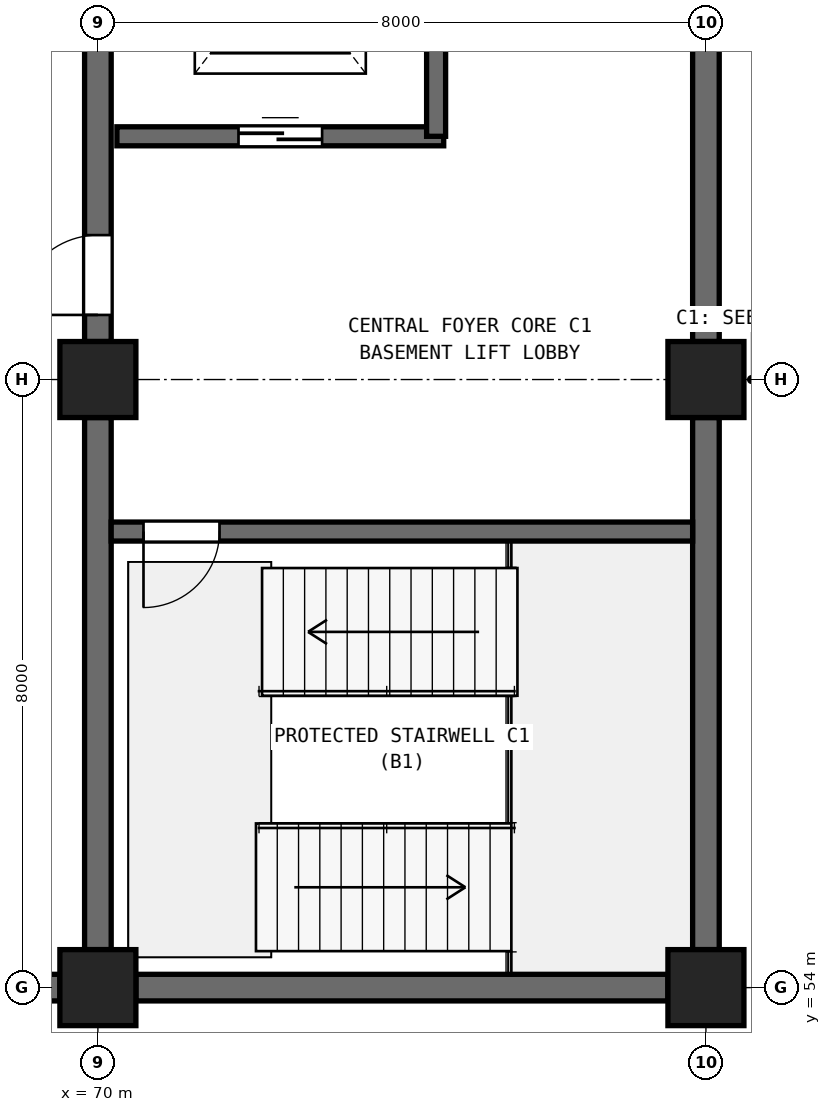
"""IFC4 building model, lengths in metres.
Left out: names, types, materials, properties, quantities, classifications, styles, units other than length and angle.
Written with IfcOpenShell. Run it as: python <this file> out.ifc"""

import sys

from ifc_helpers import new_model, si_unit, direction, frame, frame_2d, origin, origin_2d, place, context, subcontext, project, spatial, rectangle, extrude, element, fill, save


model = new_model("IFC4")
c1 = context("Model", 3, precision=1e-05, world=origin(), true_north=direction((0.0, 1.0)))
c2 = subcontext(c1, "Body", "Model", "MODEL_VIEW")
j1 = project(units=[si_unit("LENGTHUNIT", "METRE"), si_unit("PLANEANGLEUNIT", "RADIAN")], contexts=[c1])
p1 = place(None, origin())
s1 = spatial("IfcSite", under=j1, at=p1, CompositionType="ELEMENT")
p2 = place(p1, origin())
s2 = spatial("IfcBuilding", under=s1, at=p2, CompositionType="ELEMENT")
p3 = place(p2, frame((0.0, 0.0, -4.2)))
s3 = spatial("IfcBuildingStorey", under=s2, at=p3, CompositionType="ELEMENT", Elevation=-4.2)
for number, where, z_axis, x_axis in (
    (1, (70.0, 54.0, 0.0), (0.0, 0.0, 1.0), (1.0, 0.0, 0.0)),
    (2, (70.0, 62.0, 0.0), (0.0, 0.0, 1.0), (1.0, 0.0, 0.0)),
    (3, (78.0, 54.0, 0.0), (0.0, 0.0, 1.0), (1.0, 0.0, 0.0)),
    (4, (78.0, 62.0, 0.0), (0.0, 0.0, 1.0), (1.0, 0.0, 0.0)),
):
    element("IfcColumn", number, at=place(p3, frame(where, z_axis=z_axis, x_axis=x_axis)), inside=s3, PredefinedType="COLUMN", context=c2, shape_type="SweptSolid", body=[
        extrude(rectangle(XDim=1.0, YDim=1.0, at=origin_2d()), origin(), (0.0, 0.0, 1.0), 4.2),
    ])
p4 = place(p3, frame((62.35, 54.0, 0.0), z_axis=(0.0, 0.0, 1.0), x_axis=(1.0, 0.0, 0.0)))
e5 = element("IfcWall", 5, at=p4, inside=s3, PredefinedType="USERDEFINED", context=c2, shape_type="SweptSolid", body=[
    extrude(rectangle(XDim=7.15, YDim=0.35, at=frame_2d((3.575, 0.0))), origin(), (0.0, 0.0, 1.0), 3.92),
])
for number, where, z_axis, x_axis in (
    (6, (70.5, 54.0, 0.0), (0.0, 0.0, 1.0), (1.0, 0.0, 0.0)),
    (7, (70.0, 54.5, 0.0), (0.0, 0.0, 1.0), (0.0, 1.0, 0.0)),
):
    element("IfcWall", number, at=place(p3, frame(where, z_axis=z_axis, x_axis=x_axis)), inside=s3, PredefinedType="SHEAR", context=c2, shape_type="SweptSolid", body=[
        extrude(rectangle(XDim=7.0, YDim=0.35, at=frame_2d((3.5, 0.0))), origin(), (0.0, 0.0, 1.0), 3.98),
    ])
p5 = place(p3, frame((70.0, 62.5, 0.0), z_axis=(0.0, 0.0, 1.0), x_axis=(0.0, 1.0, 0.0)))
e8 = element("IfcWall", 8, at=p5, inside=s3, PredefinedType="SHEAR", context=c2, shape_type="SweptSolid", body=[
    extrude(rectangle(XDim=7.0, YDim=0.35, at=frame_2d((3.5, 0.0))), origin(), (0.0, 0.0, 1.0), 3.98),
])
p6 = place(p5, frame((0.35, 0.0, 0.0)))
e9 = element("IfcOpeningElement", 9, at=p6, cuts=e8, PredefinedType="OPENING", context=c2, shape_type="SweptSolid", body=[
    extrude(rectangle(XDim=1.05, YDim=2.2, at=frame_2d((0.525, 1.1))), frame((0.0, 0.185, 0.0), z_axis=(0.0, -1.0, 0.0), x_axis=(1.0, 0.0, 0.0)), (0.0, 0.0, 1.0), 0.37),
])
for number, where, z_axis, x_axis in (
    (10, (78.0, 54.5, 0.0), (0.0, 0.0, 1.0), (0.0, 1.0, 0.0)),
    (11, (78.0, 62.5, 0.0), (0.0, 0.0, 1.0), (0.0, 1.0, 0.0)),
):
    element("IfcWall", number, at=place(p3, frame(where, z_axis=z_axis, x_axis=x_axis)), inside=s3, PredefinedType="SHEAR", context=c2, shape_type="SweptSolid", body=[
        extrude(rectangle(XDim=7.0, YDim=0.35, at=frame_2d((3.5, 0.0))), origin(), (0.0, 0.0, 1.0), 3.98),
    ])
p7 = place(p3, frame((70.175, 60.0, 0.0), z_axis=(0.0, 0.0, 1.0), x_axis=(1.0, 0.0, 0.0)))
e12 = element("IfcWall", 12, at=p7, inside=s3, PredefinedType="SOLIDWALL", context=c2, shape_type="SweptSolid", body=[
    extrude(rectangle(XDim=7.65, YDim=0.25, at=frame_2d((3.825, 0.0))), origin(), (0.0, 0.0, 1.0), 3.98),
])
p8 = place(p7, frame((0.425, 0.0, 0.0)))
e13 = element("IfcOpeningElement", 13, at=p8, cuts=e12, PredefinedType="OPENING", context=c2, shape_type="SweptSolid", body=[
    extrude(rectangle(XDim=1.0, YDim=2.2, at=frame_2d((0.5, 1.1))), frame((0.0, 0.135, 0.0), z_axis=(0.0, -1.0, 0.0), x_axis=(1.0, 0.0, 0.0)), (0.0, 0.0, 1.0), 0.27),
])
p9 = place(p3, frame((70.25, 65.2, 0.0), z_axis=(0.0, 0.0, 1.0), x_axis=(1.0, 0.0, 0.0)))
e14 = element("IfcWall", 14, at=p9, inside=s3, PredefinedType="SOLIDWALL", context=c2, shape_type="SweptSolid", body=[
    extrude(rectangle(XDim=4.3, YDim=0.25, at=frame_2d((2.15, 0.0))), origin(), (0.0, 0.0, 1.0), 3.98),
])
p10 = place(p9, frame((1.6, 0.0, 0.0)))
e15 = element("IfcOpeningElement", 15, at=p10, cuts=e14, PredefinedType="OPENING", context=c2, shape_type="SweptSolid", body=[
    extrude(rectangle(XDim=1.1, YDim=2.2, at=frame_2d((0.55, 1.1))), frame((0.0, 0.135, 0.0), z_axis=(0.0, -1.0, 0.0), x_axis=(1.0, 0.0, 0.0)), (0.0, 0.0, 1.0), 0.27),
])
p11 = place(p3, frame((74.45, 65.2, 0.0), z_axis=(0.0, 0.0, 1.0), x_axis=(0.0, 1.0, 0.0)))
e16 = element("IfcWall", 16, at=p11, inside=s3, PredefinedType="SOLIDWALL", context=c2, shape_type="SweptSolid", body=[
    extrude(rectangle(XDim=4.55, YDim=0.25, at=frame_2d((2.275, 0.0))), origin(), (0.0, 0.0, 1.0), 3.98),
])
p12 = place(p6, origin())
e17 = element("IfcDoor", 17, at=p12, inside=s3, OperationType="SINGLE_SWING_LEFT", PredefinedType="DOOR", context=c2, shape_type="SweptSolid", body=[
    extrude(rectangle(XDim=1.05, YDim=2.2, at=frame_2d((0.525, 1.1))), frame((0.0, 0.025, 0.0), z_axis=(0.0, -1.0, 0.0), x_axis=(1.0, 0.0, 0.0)), (0.0, 0.0, 1.0), 0.05),
])
fill(e9, e17)
p13 = place(p8, frame((1.0, 0.0, 0.0), z_axis=(0.0, 0.0, 1.0), x_axis=(-1.0, 0.0, 0.0)))
e18 = element("IfcDoor", 18, at=p13, inside=s3, OperationType="SINGLE_SWING_LEFT", PredefinedType="DOOR", context=c2, shape_type="SweptSolid", body=[
    extrude(rectangle(XDim=1.0, YDim=2.2, at=frame_2d((0.5, 1.1))), frame((0.0, 0.025, 0.0), z_axis=(0.0, -1.0, 0.0), x_axis=(1.0, 0.0, 0.0)), (0.0, 0.0, 1.0), 0.05),
])
fill(e13, e18)
p14 = place(p10, origin())
e19 = element("IfcDoor", 19, at=p14, inside=s3, OperationType="DOUBLE_DOOR_SLIDING", PredefinedType="DOOR", context=c2, shape_type="SweptSolid", body=[
    extrude(rectangle(XDim=1.1, YDim=2.2, at=frame_2d((0.55, 1.1))), frame((0.0, 0.025, 0.0), z_axis=(0.0, -1.0, 0.0), x_axis=(1.0, 0.0, 0.0)), (0.0, 0.0, 1.0), 0.05),
])
fill(e15, e19)
save(model, sys.argv[1])
